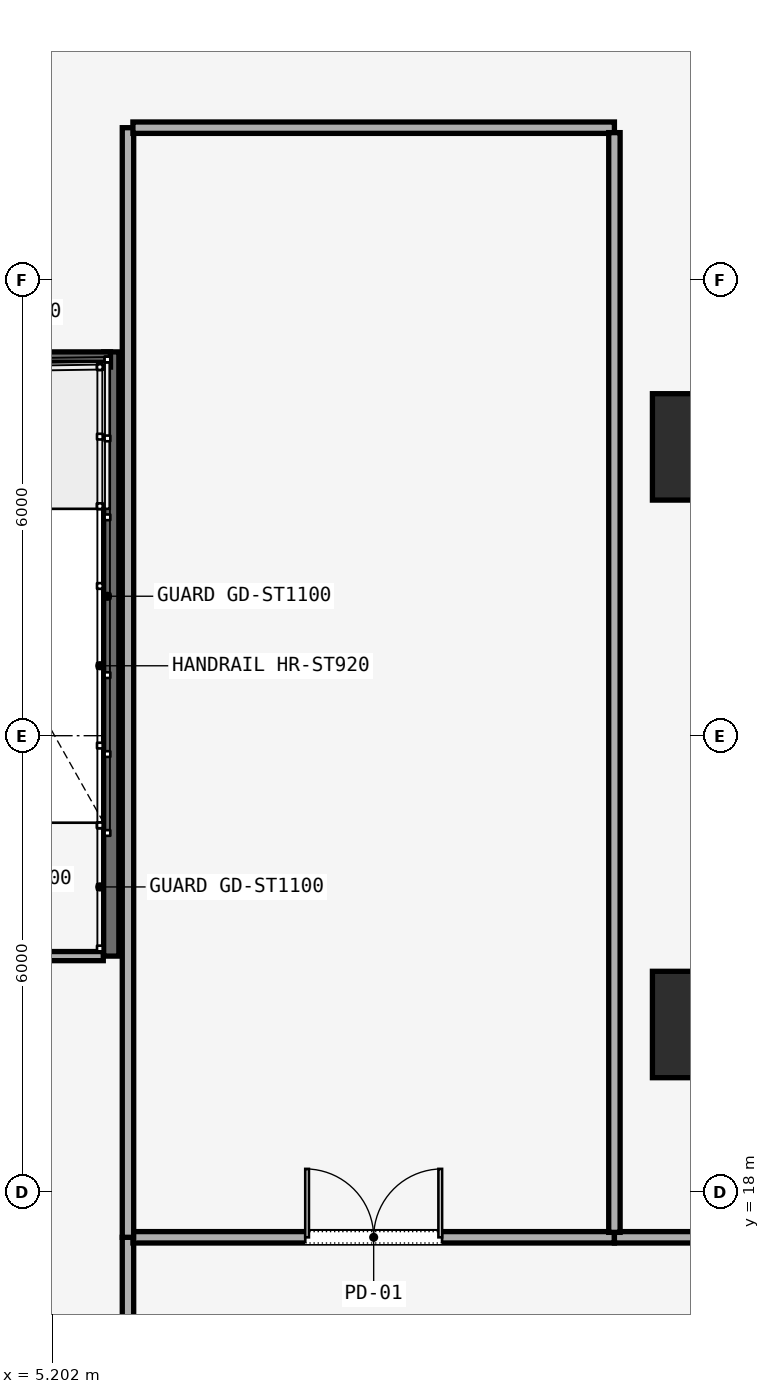
"""IFC4 building model, lengths in metres.
Left out: names, types, materials, properties, quantities, classifications, styles, units other than length and angle.
Written with IfcOpenShell. Run it as: python <this file> out.ifc"""

import sys

from ifc_helpers import new_model, si_unit, direction, frame, frame_2d, origin, origin_2d, place, context, subcontext, project, spatial, rectangle, extrude, element, fill, save


model = new_model("IFC4")
c1 = context("Model", 3, precision=1e-05, world=origin(), true_north=direction((0.0, 1.0)))
c2 = subcontext(c1, "Body", "Model", "MODEL_VIEW")
j1 = project(units=[si_unit("LENGTHUNIT", "METRE"), si_unit("PLANEANGLEUNIT", "RADIAN")], contexts=[c1])
p1 = place(None, origin())
s1 = spatial("IfcSite", under=j1, at=p1, CompositionType="ELEMENT")
p2 = place(p1, origin())
s2 = spatial("IfcBuilding", under=s1, at=p2, CompositionType="ELEMENT")
p3 = place(p2, frame((0.0, 0.0, 24.0)))
s3 = spatial("IfcBuildingStorey", under=s2, at=p3, CompositionType="ELEMENT", Elevation=24.0)
for number, where, z_axis, x_axis in (
    (1, (13.8, 20.2, 0.0), (0.0, 0.0, 1.0), (1.0, 0.0, 0.0)),
    (2, (13.8, 27.8, 0.0), (0.0, 0.0, 1.0), (1.0, 0.0, 0.0)),
):
    element("IfcColumn", number, at=place(p3, frame(where, z_axis=z_axis, x_axis=x_axis)), inside=s3, PredefinedType="COLUMN", context=c2, shape_type="SweptSolid", body=[
        extrude(rectangle(XDim=1.4, YDim=1.4, at=origin_2d()), origin(), (0.0, 0.0, 1.0), 5.55),
    ])
p4 = place(p3, frame((5.98, 21.1, 0.0), z_axis=(0.0, 0.0, 1.0), x_axis=(0.0, 1.0, 0.0)))
e3 = element("IfcWall", 3, at=p4, inside=s3, PredefinedType="SOLIDWALL", context=c2, shape_type="SweptSolid", body=[
    extrude(rectangle(XDim=7.95, YDim=0.2, at=frame_2d((3.975, 0.0))), origin(), (0.0, 0.0, 1.0), 6.0),
])
p5 = place(p3, frame((5.97, 28.95, 0.0), z_axis=(0.0, 0.0, 1.0), x_axis=(-1.0, 0.0, 0.0)))
e4 = element("IfcWall", 4, at=p5, inside=s3, PredefinedType="SOLIDWALL", context=c2, shape_type="SweptSolid", body=[
    extrude(rectangle(XDim=3.56, YDim=0.2, at=frame_2d((1.78, 0.0))), origin(), (0.0, 0.0, 1.0), 6.0),
])
p6 = place(p3, frame((5.875, 21.1, 0.0), z_axis=(0.0, 0.0, 1.0), x_axis=(-1.0, 0.0, 0.0)))
e5 = element("IfcWall", 5, at=p6, inside=s3, PredefinedType="SOLIDWALL", context=c2, shape_type="SweptSolid", body=[
    extrude(rectangle(XDim=3.37, YDim=0.12, at=frame_2d((1.685, 0.0))), origin(), (0.0, 0.0, 1.0), 4.17),
])
p7 = place(p6, frame((1.24, 0.0, 0.0)))
e6 = element("IfcOpeningElement", 6, at=p7, cuts=e5, PredefinedType="OPENING", context=c2, shape_type="SweptSolid", body=[
    extrude(rectangle(XDim=1.1, YDim=2.2, at=frame_2d((0.55, 1.1))), frame((0.0, 0.06, 0.0), z_axis=(0.0, -1.0, 0.0), x_axis=(1.0, 0.0, 0.0)), (0.0, 0.0, 1.0), 0.12),
])
p8 = place(p3, frame((6.2, 15.215, 0.0), z_axis=(0.0, 0.0, 1.0), x_axis=(0.0, 1.0, 0.0)))
e7 = element("IfcWall", 7, at=p8, inside=s3, PredefinedType="PARTITIONING", context=c2, shape_type="SweptSolid", body=[
    extrude(rectangle(XDim=2.185, YDim=0.15, at=frame_2d((1.092, 0.0))), origin(), (0.0, 0.0, 1.0), 4.17),
])
p9 = place(p3, frame((6.265, 17.4, 0.0), z_axis=(0.0, 0.0, 1.0), x_axis=(1.0, 0.0, 0.0)))
e8 = element("IfcWall", 8, at=p9, inside=s3, PredefinedType="PARTITIONING", context=c2, shape_type="SweptSolid", body=[
    extrude(rectangle(XDim=6.335, YDim=0.15, at=frame_2d((3.167, 0.0))), origin(), (0.0, 0.0, 1.0), 4.17),
])
p10 = place(p9, frame((2.268, 0.0, 0.0)))
e9 = element("IfcOpeningElement", 9, at=p10, cuts=e8, PredefinedType="OPENING", context=c2, shape_type="SweptSolid", body=[
    extrude(rectangle(XDim=1.8, YDim=2.3, at=frame_2d((0.9, 1.15))), frame((0.0, 0.075, 0.0), z_axis=(0.0, -1.0, 0.0), x_axis=(1.0, 0.0, 0.0)), (0.0, 0.0, 1.0), 0.15),
])
p11 = place(p3, frame((12.6, 17.4, 0.0), z_axis=(0.0, 0.0, 1.0), x_axis=(1.0, 0.0, 0.0)))
e10 = element("IfcWall", 10, at=p11, inside=s3, PredefinedType="PARTITIONING", context=c2, shape_type="SweptSolid", body=[
    extrude(rectangle(XDim=2.55, YDim=0.15, at=frame_2d((1.275, 0.0))), origin(), (0.0, 0.0, 1.0), 4.17),
])
p12 = place(p3, frame((6.2, 17.4, 0.0), z_axis=(0.0, 0.0, 1.0), x_axis=(0.0, 1.0, 0.0)))
e11 = element("IfcWall", 11, at=p12, inside=s3, PredefinedType="PARTITIONING", context=c2, shape_type="SweptSolid", body=[
    extrude(rectangle(XDim=14.6, YDim=0.15, at=frame_2d((7.3, 0.0))), origin(), (0.0, 0.0, 1.0), 4.17),
])
p13 = place(p3, frame((6.265, 32.0, 0.0), z_axis=(0.0, 0.0, 1.0), x_axis=(1.0, 0.0, 0.0)))
e12 = element("IfcWall", 12, at=p13, inside=s3, PredefinedType="PARTITIONING", context=c2, shape_type="SweptSolid", body=[
    extrude(rectangle(XDim=6.335, YDim=0.15, at=frame_2d((3.167, 0.0))), origin(), (0.0, 0.0, 1.0), 4.17),
])
p14 = place(p3, frame((12.6, 31.935, 0.0), z_axis=(0.0, 0.0, 1.0), x_axis=(0.0, -1.0, 0.0)))
e13 = element("IfcWall", 13, at=p14, inside=s3, PredefinedType="PARTITIONING", context=c2, shape_type="SweptSolid", body=[
    extrude(rectangle(XDim=14.47, YDim=0.15, at=frame_2d((7.235, 0.0))), origin(), (0.0, 0.0, 1.0), 4.17),
])
p15 = place(p10, origin())
e14 = element("IfcDoor", 14, at=p15, inside=s3, OperationType="SINGLE_SWING_LEFT", PredefinedType="DOOR", context=c2, shape_type="SweptSolid", body=[
    extrude(rectangle(XDim=1.8, YDim=2.3, at=frame_2d((0.9, 1.15))), frame((0.0, 0.025, 0.0), z_axis=(0.0, -1.0, 0.0), x_axis=(1.0, 0.0, 0.0)), (0.0, 0.0, 1.0), 0.05),
])
fill(e9, e14)
save(model, sys.argv[1])
